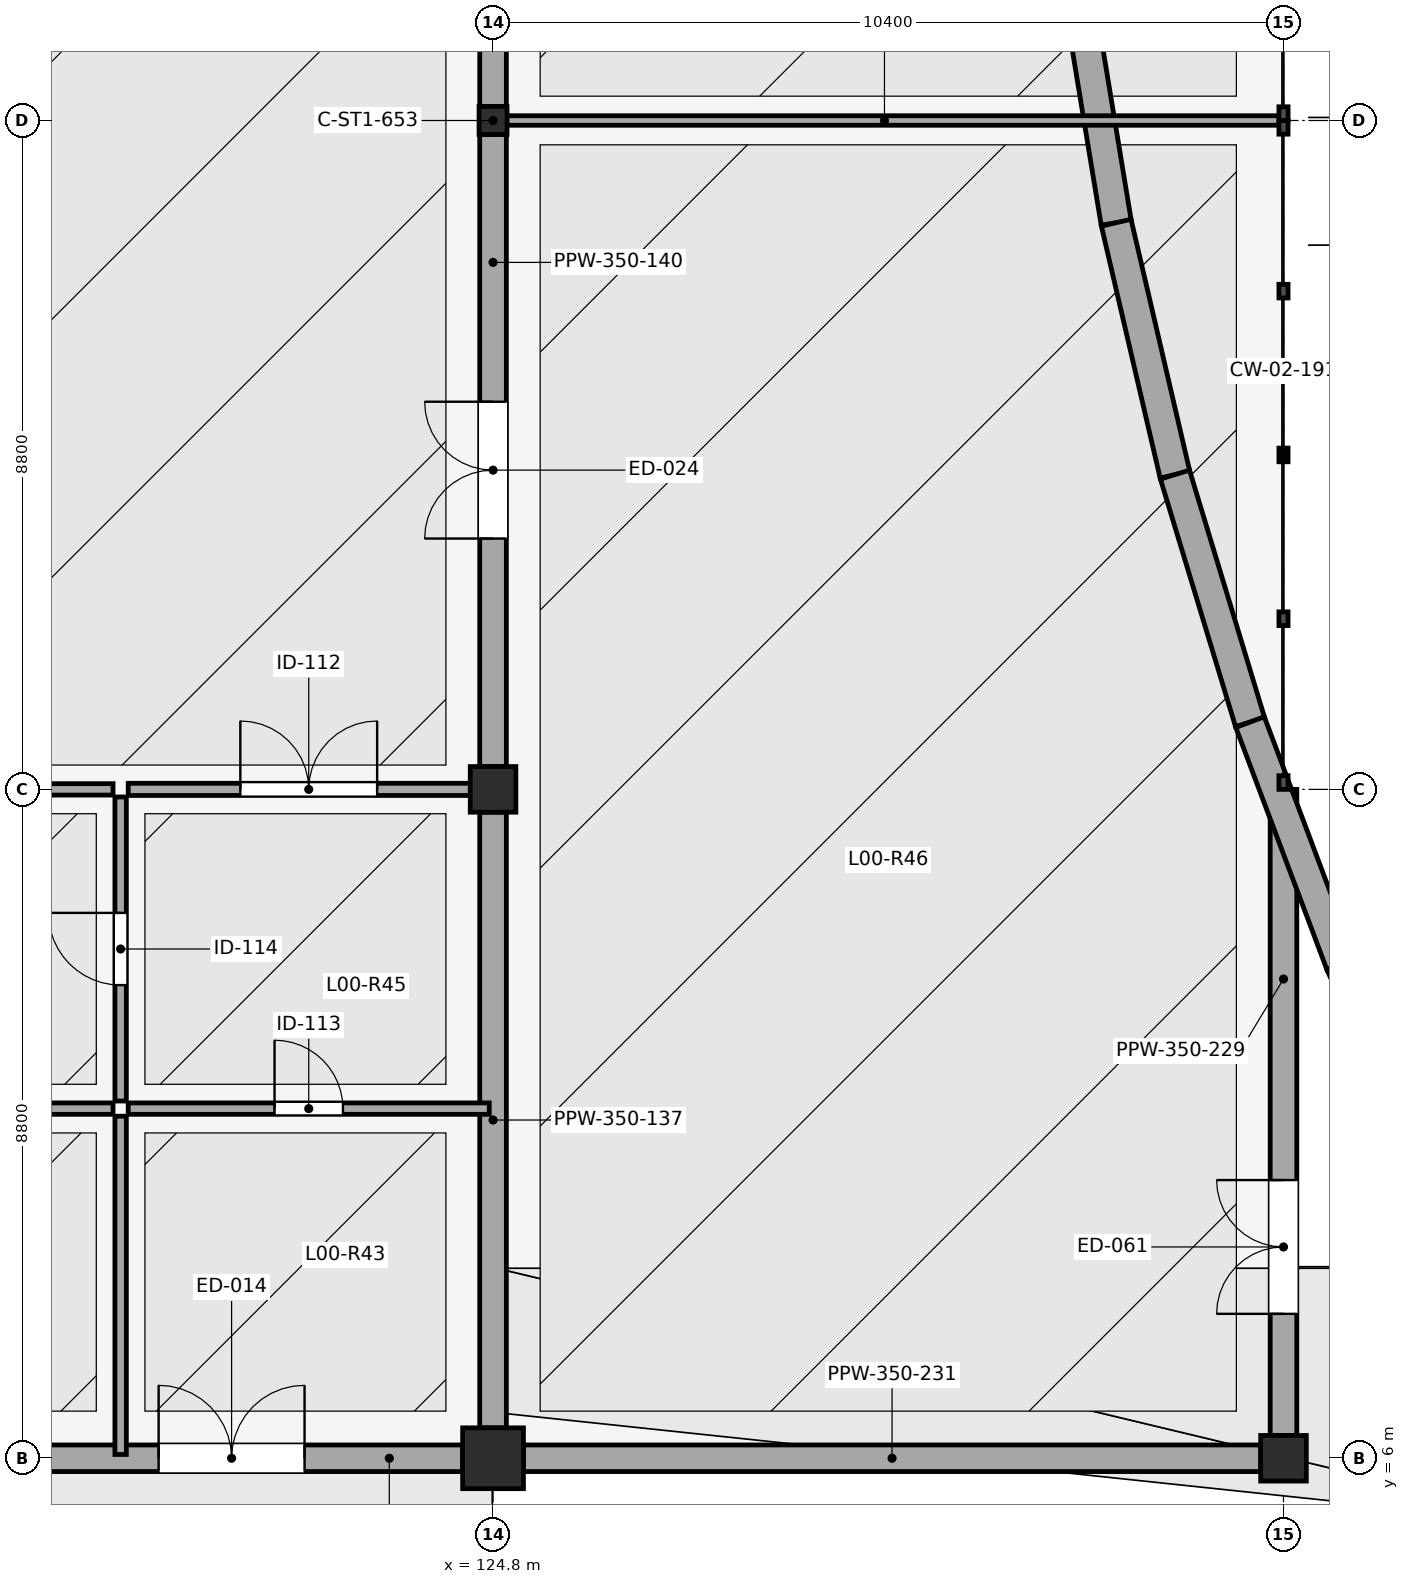
"""IFC4 building model, lengths in metres.
Left out: names, types, materials, properties, quantities, classifications, styles, units other than length and angle.
Written with IfcOpenShell. Run it as: python <this file> out.ifc"""

import sys

from ifc_helpers import new_model, si_unit, direction, frame, frame_2d, origin, origin_2d, place, context, subcontext, project, spatial, rectangle, i_section, extrude, element, fill, save


model = new_model("IFC4")
c1 = context("Model", 3, precision=1e-05, world=origin(), true_north=direction((0.0, 1.0)))
c2 = subcontext(c1, "Body", "Model", "MODEL_VIEW")
j1 = project(units=[si_unit("LENGTHUNIT", "METRE"), si_unit("PLANEANGLEUNIT", "RADIAN")], contexts=[c1])
p1 = place(None, origin())
s1 = spatial("IfcSite", under=j1, at=p1, CompositionType="ELEMENT")
p2 = place(p1, origin())
s2 = spatial("IfcBuilding", under=s1, at=p2, CompositionType="ELEMENT")
p3 = place(p2, origin())
s3 = spatial("IfcBuildingStorey", under=s2, at=p3, CompositionType="ELEMENT", Elevation=0.0)
p4 = place(p3, frame((124.8, 6.0, 0.0), z_axis=(0.0, 0.0, 1.0), x_axis=(1.0, 0.0, 0.0)))
e1 = element("IfcColumn", 1, at=p4, inside=s3, PredefinedType="COLUMN", context=c2, shape_type="SweptSolid", body=[
    extrude(rectangle(XDim=0.8, YDim=0.8, at=origin_2d()), origin(), (0.0, 0.0, 1.0), 4.8),
])
p5 = place(p3, frame((124.8, 14.8, 0.0), z_axis=(0.0, 0.0, 1.0), x_axis=(1.0, 0.0, 0.0)))
e2 = element("IfcColumn", 2, at=p5, inside=s3, PredefinedType="COLUMN", context=c2, shape_type="SweptSolid", body=[
    extrude(rectangle(XDim=0.6, YDim=0.6, at=origin_2d()), origin(), (0.0, 0.0, 1.0), 4.8),
])
p6 = place(p3, frame((124.8, 23.6, 0.0), z_axis=(0.0, 0.0, 1.0), x_axis=(1.0, 0.0, 0.0)))
e3 = element("IfcColumn", 3, at=p6, inside=s3, PredefinedType="COLUMN", context=c2, shape_type="SweptSolid", body=[
    extrude(i_section(OverallWidth=0.368, OverallDepth=0.368, WebThickness=0.015, FlangeThickness=0.024, FilletRadius=0.025, at=origin_2d()), origin(), (0.0, 0.0, 1.0), 4.8),
])
p7 = place(p3, frame((135.2, 6.0, 0.0), z_axis=(0.0, 0.0, 1.0), x_axis=(1.0, 0.0, 0.0)))
e4 = element("IfcColumn", 4, at=p7, inside=s3, PredefinedType="COLUMN", context=c2, shape_type="SweptSolid", body=[
    extrude(rectangle(XDim=0.6, YDim=0.6, at=origin_2d()), origin(), (0.0, 0.0, 1.0), 4.8),
])
p8 = place(p3, frame((115.6, 6.0, 0.0), z_axis=(0.0, 0.0, 1.0), x_axis=(1.0, 0.0, 0.0)))
e5 = element("IfcWall", 5, at=p8, inside=s3, PredefinedType="SOLIDWALL", context=c2, shape_type="SweptSolid", body=[
    extrude(rectangle(XDim=8.8, YDim=0.35, at=frame_2d((4.4, 0.0))), origin(), (0.0, 0.0, 1.0), 4.1),
])
p9 = place(p8, frame((1.4, 0.0, 0.0)))
e6 = element("IfcOpeningElement", 6, at=p9, cuts=e5, PredefinedType="OPENING", context=c2, shape_type="SweptSolid", body=[
    extrude(rectangle(XDim=1.96, YDim=2.37, at=frame_2d((0.98, 1.185))), frame((0.0, 0.185, 0.0), z_axis=(0.0, -1.0, 0.0), x_axis=(1.0, 0.0, 0.0)), (0.0, 0.0, 1.0), 0.37),
])
p10 = place(p8, frame((4.8, 0.0, 0.0)))
e7 = element("IfcOpeningElement", 7, at=p10, cuts=e5, PredefinedType="OPENING", context=c2, shape_type="SweptSolid", body=[
    extrude(rectangle(XDim=1.92, YDim=2.34, at=frame_2d((0.96, 1.17))), frame((0.0, 0.185, 0.0), z_axis=(0.0, -1.0, 0.0), x_axis=(1.0, 0.0, 0.0)), (0.0, 0.0, 1.0), 0.37),
])
p11 = place(p3, frame((124.8, 6.4, 0.0), z_axis=(0.0, 0.0, 1.0), x_axis=(0.0, 1.0, 0.0)))
e8 = element("IfcWall", 8, at=p11, inside=s3, PredefinedType="SOLIDWALL", context=c2, shape_type="SweptSolid", body=[
    extrude(rectangle(XDim=8.1, YDim=0.35, at=frame_2d((4.05, 0.0))), origin(), (0.0, 0.0, 1.0), 4.1),
])
p12 = place(p3, frame((124.8, 15.1, 0.0), z_axis=(0.0, 0.0, 1.0), x_axis=(0.0, 1.0, 0.0)))
e9 = element("IfcWall", 9, at=p12, inside=s3, PredefinedType="SOLIDWALL", context=c2, shape_type="SweptSolid", body=[
    extrude(rectangle(XDim=8.316, YDim=0.35, at=frame_2d((4.158, 0.0))), origin(), (0.0, 0.0, 1.0), 4.1),
])
p13 = place(p12, frame((3.0, 0.0, 0.0)))
e10 = element("IfcOpeningElement", 10, at=p13, cuts=e9, PredefinedType="OPENING", context=c2, shape_type="SweptSolid", body=[
    extrude(rectangle(XDim=1.8, YDim=2.4, at=frame_2d((0.9, 1.2))), frame((0.0, 0.185, 0.0), z_axis=(0.0, -1.0, 0.0), x_axis=(1.0, 0.0, 0.0)), (0.0, 0.0, 1.0), 0.37),
])
p14 = place(p3, frame((124.8, 23.784, 0.0), z_axis=(0.0, 0.0, 1.0), x_axis=(0.0, 1.0, 0.0)))
e11 = element("IfcWall", 11, at=p14, inside=s3, PredefinedType="SOLIDWALL", context=c2, shape_type="SweptSolid", body=[
    extrude(rectangle(XDim=8.432, YDim=0.35, at=frame_2d((4.216, 0.0))), origin(), (0.0, 0.0, 1.0), 4.1),
])
p15 = place(p14, frame((3.0, 0.0, 0.0)))
e12 = element("IfcOpeningElement", 12, at=p15, cuts=e11, PredefinedType="OPENING", context=c2, shape_type="SweptSolid", body=[
    extrude(rectangle(XDim=1.76, YDim=2.37, at=frame_2d((0.88, 1.185))), frame((0.0, 0.185, 0.0), z_axis=(0.0, -1.0, 0.0), x_axis=(1.0, 0.0, 0.0)), (0.0, 0.0, 1.0), 0.37),
])
p16 = place(p3, frame((135.2, 6.3, 0.0), z_axis=(0.0, 0.0, 1.0), x_axis=(0.0, 1.0, 0.0)))
e13 = element("IfcWall", 13, at=p16, inside=s3, PredefinedType="SOLIDWALL", context=c2, shape_type="SweptSolid", body=[
    extrude(rectangle(XDim=8.5, YDim=0.35, at=frame_2d((4.25, 0.0))), origin(), (0.0, 0.0, 1.0), 4.1),
])
p17 = place(p16, frame((1.6, 0.0, 0.0)))
e14 = element("IfcOpeningElement", 14, at=p17, cuts=e13, PredefinedType="OPENING", context=c2, shape_type="SweptSolid", body=[
    extrude(rectangle(XDim=1.76, YDim=2.37, at=frame_2d((0.88, 1.185))), frame((0.0, 0.185, 0.0), z_axis=(0.0, -1.0, 0.0), x_axis=(1.0, 0.0, 0.0)), (0.0, 0.0, 1.0), 0.37),
])
p18 = place(p3, frame((125.2, 6.0, 0.0), z_axis=(0.0, 0.0, 1.0), x_axis=(1.0, 0.0, 0.0)))
e15 = element("IfcWall", 15, at=p18, inside=s3, PredefinedType="SOLIDWALL", context=c2, shape_type="SweptSolid", body=[
    extrude(rectangle(XDim=9.7, YDim=0.35, at=frame_2d((4.85, 0.0))), origin(), (0.0, 0.0, 1.0), 4.1),
])
p19 = place(p3, frame((135.816, 26.056, -1.3), z_axis=(0.0, 0.0, 1.0), x_axis=(0.162941931057, -0.98663566077, 0.0)))
e16 = element("IfcWall", 16, at=p19, inside=s3, PredefinedType="SOLIDWALL", context=c2, shape_type="SweptSolid", body=[
    extrude(rectangle(XDim=3.179, YDim=0.4, at=frame_2d((1.59, 0.0))), origin(), (0.0, 0.0, 1.0), 5.84),
])
p20 = place(p3, frame((132.445, 25.613, -1.3), z_axis=(0.0, 0.0, 1.0), x_axis=(0.162758630432, -0.986665915201, 0.0)))
e17 = element("IfcWall", 17, at=p20, inside=s3, PredefinedType="SOLIDWALL", context=c2, shape_type="SweptSolid", body=[
    extrude(rectangle(XDim=3.404, YDim=0.4, at=frame_2d((1.702, 0.0))), origin(), (0.0, 0.0, 1.0), 5.84),
])
p21 = place(p3, frame((132.999, 22.255, -1.3), z_axis=(0.0, 0.0, 1.0), x_axis=(0.227143430466, -0.973861315587, 0.0)))
e18 = element("IfcWall", 18, at=p21, inside=s3, PredefinedType="SOLIDWALL", context=c2, shape_type="SweptSolid", body=[
    extrude(rectangle(XDim=3.403, YDim=0.4, at=frame_2d((1.701, 0.0))), origin(), (0.0, 0.0, 1.0), 5.84),
])
p22 = place(p3, frame((133.772, 18.941, -1.3), z_axis=(0.0, 0.0, 1.0), x_axis=(0.290387746123, -0.956909064071, 0.0)))
e19 = element("IfcWall", 19, at=p22, inside=s3, PredefinedType="SOLIDWALL", context=c2, shape_type="SweptSolid", body=[
    extrude(rectangle(XDim=3.403, YDim=0.4, at=frame_2d((1.701, 0.0))), origin(), (0.0, 0.0, 1.0), 5.84),
])
for number, where, z_axis, x_axis in (
    (20, (134.76, 15.685, -1.3), (0.0, 0.0, 1.0), (0.352, -0.936, 0.0)),
    (21, (135.958, 12.5, -1.3), (0.0, 0.0, 1.0), (0.413, -0.911, 0.0)),
):
    element("IfcWall", number, at=place(p3, frame(where, z_axis=z_axis, x_axis=x_axis)), inside=s3, PredefinedType="SOLIDWALL", context=c2, shape_type="SweptSolid", body=[
        extrude(rectangle(XDim=3.403, YDim=0.4, at=frame_2d((1.701, 0.0))), origin(), (0.0, 0.0, 1.0), 5.84),
    ])
p23 = place(p3, frame((115.15, 14.8, 0.0), z_axis=(0.0, 0.0, 1.0), x_axis=(1.0, 0.0, 0.0)))
e22 = element("IfcWall", 22, at=p23, inside=s3, PredefinedType="PARTITIONING", context=c2, shape_type="SweptSolid", body=[
    extrude(rectangle(XDim=4.65, YDim=0.15, at=frame_2d((2.325, 0.0))), origin(), (0.0, 0.0, 1.0), 3.835),
])
p24 = place(p23, frame((1.85, 0.0, 0.0)))
e23 = element("IfcOpeningElement", 23, at=p24, cuts=e22, PredefinedType="OPENING", context=c2, shape_type="SweptSolid", body=[
    extrude(rectangle(XDim=0.95, YDim=2.15, at=frame_2d((0.475, 1.075))), frame((0.0, 0.085, 0.0), z_axis=(0.0, -1.0, 0.0), x_axis=(1.0, 0.0, 0.0)), (0.0, 0.0, 1.0), 0.17),
])
p25 = place(p3, frame((120.0, 14.8, 0.0), z_axis=(0.0, 0.0, 1.0), x_axis=(1.0, 0.0, 0.0)))
e24 = element("IfcWall", 24, at=p25, inside=s3, PredefinedType="PARTITIONING", context=c2, shape_type="SweptSolid", body=[
    extrude(rectangle(XDim=4.75, YDim=0.16, at=frame_2d((2.375, 0.0))), origin(), (0.0, 0.0, 1.0), 3.835),
])
p26 = place(p25, frame((1.475, 0.0, 0.0)))
e25 = element("IfcOpeningElement", 25, at=p26, cuts=e24, PredefinedType="OPENING", context=c2, shape_type="SweptSolid", body=[
    extrude(rectangle(XDim=1.8, YDim=2.15, at=frame_2d((0.9, 1.075))), frame((0.0, 0.09, 0.0), z_axis=(0.0, -1.0, 0.0), x_axis=(1.0, 0.0, 0.0)), (0.0, 0.0, 1.0), 0.18),
])
p27 = place(p3, frame((119.9, 6.05, 0.0), z_axis=(0.0, 0.0, 1.0), x_axis=(0.0, 1.0, 0.0)))
e26 = element("IfcWall", 26, at=p27, inside=s3, PredefinedType="PARTITIONING", context=c2, shape_type="SweptSolid", body=[
    extrude(rectangle(XDim=4.45, YDim=0.15, at=frame_2d((2.225, 0.0))), origin(), (0.0, 0.0, 1.0), 4.42),
])
p28 = place(p3, frame((115.15, 10.6, 0.0), z_axis=(0.0, 0.0, 1.0), x_axis=(1.0, 0.0, 0.0)))
e27 = element("IfcWall", 27, at=p28, inside=s3, PredefinedType="PARTITIONING", context=c2, shape_type="SweptSolid", body=[
    extrude(rectangle(XDim=4.65, YDim=0.15, at=frame_2d((2.325, 0.0))), origin(), (0.0, 0.0, 1.0), 4.42),
])
p29 = place(p3, frame((120.0, 10.6, 0.0), z_axis=(0.0, 0.0, 1.0), x_axis=(1.0, 0.0, 0.0)))
e28 = element("IfcWall", 28, at=p29, inside=s3, PredefinedType="PARTITIONING", context=c2, shape_type="SweptSolid", body=[
    extrude(rectangle(XDim=4.75, YDim=0.15, at=frame_2d((2.375, 0.0))), origin(), (0.0, 0.0, 1.0), 4.42),
])
p30 = place(p29, frame((1.925, 0.0, 0.0)))
e29 = element("IfcOpeningElement", 29, at=p30, cuts=e28, PredefinedType="OPENING", context=c2, shape_type="SweptSolid", body=[
    extrude(rectangle(XDim=0.9, YDim=2.15, at=frame_2d((0.45, 1.075))), frame((0.0, 0.085, 0.0), z_axis=(0.0, -1.0, 0.0), x_axis=(1.0, 0.0, 0.0)), (0.0, 0.0, 1.0), 0.17),
])
p31 = place(p3, frame((119.9, 10.7, 0.0), z_axis=(0.0, 0.0, 1.0), x_axis=(0.0, 1.0, 0.0)))
e30 = element("IfcWall", 30, at=p31, inside=s3, PredefinedType="PARTITIONING", context=c2, shape_type="SweptSolid", body=[
    extrude(rectangle(XDim=4.0, YDim=0.15, at=frame_2d((2.0, 0.0))), origin(), (0.0, 0.0, 1.0), 4.42),
])
p32 = place(p31, frame((1.525, 0.0, 0.0)))
e31 = element("IfcOpeningElement", 31, at=p32, cuts=e30, PredefinedType="OPENING", context=c2, shape_type="SweptSolid", body=[
    extrude(rectangle(XDim=0.95, YDim=2.15, at=frame_2d((0.475, 1.075))), frame((0.0, 0.085, 0.0), z_axis=(0.0, -1.0, 0.0), x_axis=(1.0, 0.0, 0.0)), (0.0, 0.0, 1.0), 0.17),
])
p33 = place(p3, frame((124.75, 23.6, 0.0), z_axis=(0.0, 0.0, 1.0), x_axis=(1.0, 0.0, 0.0)))
e32 = element("IfcWall", 32, at=p33, inside=s3, PredefinedType="PARTITIONING", context=c2, shape_type="SweptSolid", body=[
    extrude(rectangle(XDim=10.4, YDim=0.125, at=frame_2d((5.2, 0.0))), origin(), (0.0, 0.0, 1.0), 3.835),
])
p34 = place(p10, origin())
e33 = element("IfcDoor", 33, at=p34, inside=s3, OperationType="DOUBLE_DOOR_SINGLE_SWING", PredefinedType="DOOR", context=c2, shape_type="SweptSolid", body=[
    extrude(rectangle(XDim=1.92, YDim=2.34, at=frame_2d((0.96, 1.17))), frame((0.0, 0.025, 0.0), z_axis=(0.0, -1.0, 0.0), x_axis=(1.0, 0.0, 0.0)), (0.0, 0.0, 1.0), 0.05),
])
fill(e7, e33)
p35 = place(p13, origin())
e34 = element("IfcDoor", 34, at=p35, inside=s3, OperationType="DOUBLE_DOOR_SINGLE_SWING", PredefinedType="DOOR", context=c2, shape_type="SweptSolid", body=[
    extrude(rectangle(XDim=1.8, YDim=2.4, at=frame_2d((0.9, 1.2))), frame((0.0, 0.025, 0.0), z_axis=(0.0, -1.0, 0.0), x_axis=(1.0, 0.0, 0.0)), (0.0, 0.0, 1.0), 0.05),
])
fill(e10, e34)
p36 = place(p17, origin())
e35 = element("IfcDoor", 35, at=p36, inside=s3, OperationType="DOUBLE_DOOR_SINGLE_SWING", PredefinedType="DOOR", context=c2, shape_type="SweptSolid", body=[
    extrude(rectangle(XDim=1.76, YDim=2.37, at=frame_2d((0.88, 1.185))), frame((0.0, 0.025, 0.0), z_axis=(0.0, -1.0, 0.0), x_axis=(1.0, 0.0, 0.0)), (0.0, 0.0, 1.0), 0.05),
])
fill(e14, e35)
p37 = place(p26, origin())
e36 = element("IfcDoor", 36, at=p37, inside=s3, OperationType="DOUBLE_DOOR_SINGLE_SWING", PredefinedType="DOOR", context=c2, shape_type="SweptSolid", body=[
    extrude(rectangle(XDim=1.8, YDim=2.15, at=frame_2d((0.9, 1.075))), frame((0.0, 0.025, 0.0), z_axis=(0.0, -1.0, 0.0), x_axis=(1.0, 0.0, 0.0)), (0.0, 0.0, 1.0), 0.05),
])
fill(e25, e36)
p38 = place(p30, origin())
e37 = element("IfcDoor", 37, at=p38, inside=s3, OperationType="SINGLE_SWING_LEFT", PredefinedType="DOOR", context=c2, shape_type="SweptSolid", body=[
    extrude(rectangle(XDim=0.9, YDim=2.15, at=frame_2d((0.45, 1.075))), frame((0.0, 0.025, 0.0), z_axis=(0.0, -1.0, 0.0), x_axis=(1.0, 0.0, 0.0)), (0.0, 0.0, 1.0), 0.05),
])
fill(e29, e37)
p39 = place(p32, origin())
e38 = element("IfcDoor", 38, at=p39, inside=s3, OperationType="SINGLE_SWING_RIGHT", PredefinedType="DOOR", context=c2, shape_type="SweptSolid", body=[
    extrude(rectangle(XDim=0.95, YDim=2.15, at=frame_2d((0.475, 1.075))), frame((0.0, 0.025, 0.0), z_axis=(0.0, -1.0, 0.0), x_axis=(1.0, 0.0, 0.0)), (0.0, 0.0, 1.0), 0.05),
])
fill(e31, e38)
save(model, sys.argv[1])
